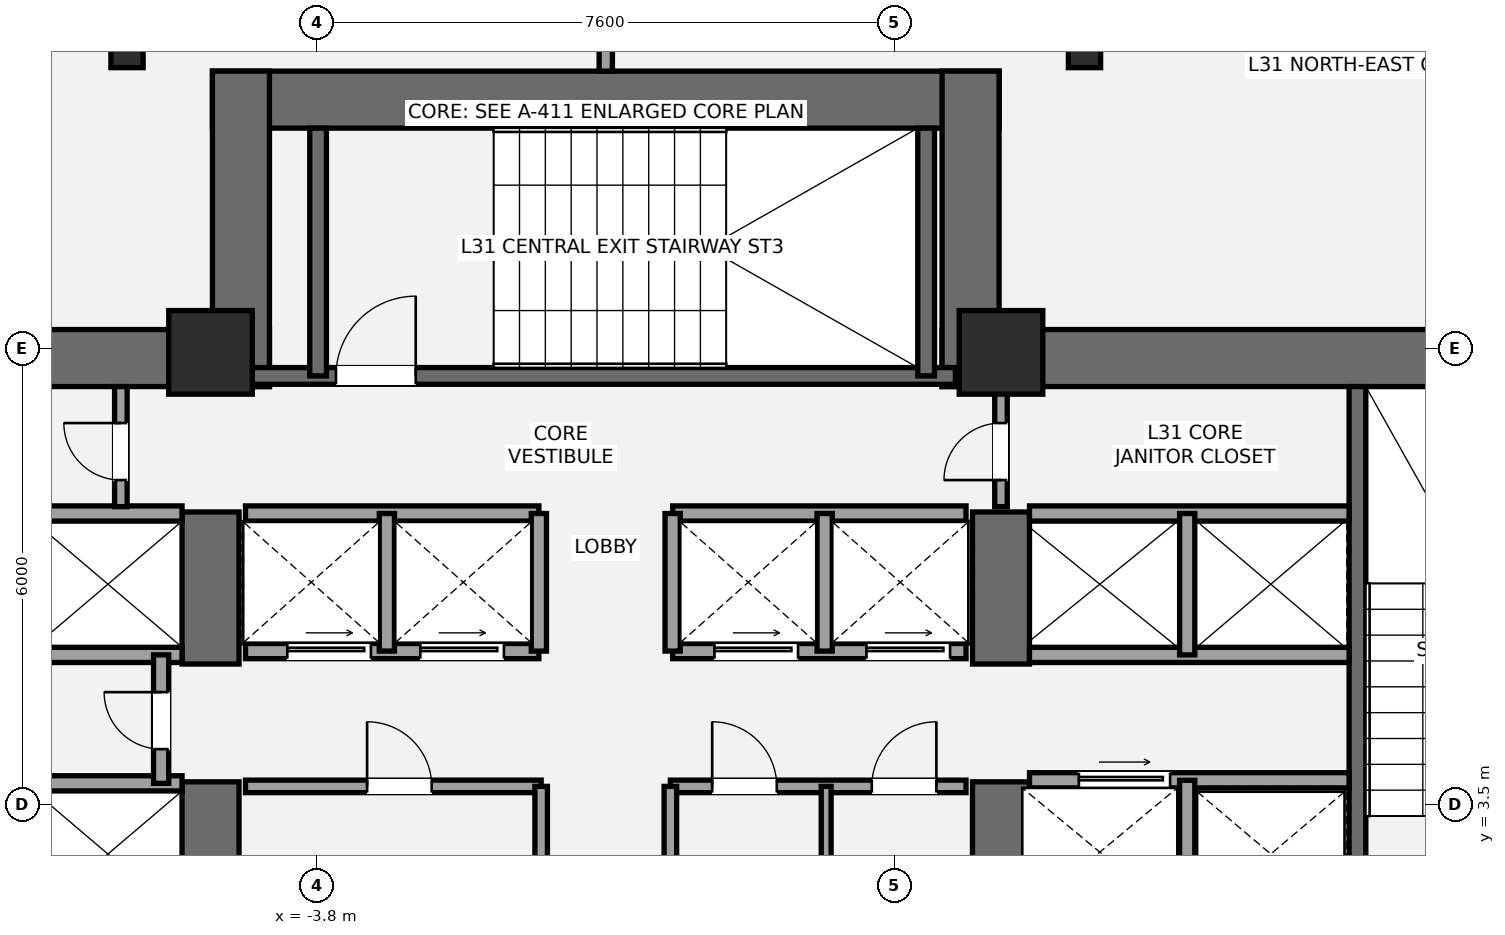
"""IFC4 building model, lengths in metres.
Left out: names, types, materials, properties, quantities, classifications, styles, units other than length and angle.
Written with IfcOpenShell. Run it as: python <this file> out.ifc"""

import sys

from ifc_helpers import new_model, si_unit, direction, frame, frame_2d, origin, origin_2d, place, context, subcontext, project, spatial, rectangle, i_section, extrude, element, fill, save


model = new_model("IFC4")
c1 = context("Model", 3, precision=1e-05, world=origin(), true_north=direction((0.0, 1.0)))
c2 = subcontext(c1, "Body", "Model", "MODEL_VIEW")
j1 = project(units=[si_unit("LENGTHUNIT", "METRE"), si_unit("PLANEANGLEUNIT", "RADIAN")], contexts=[c1])
p1 = place(None, origin())
s1 = spatial("IfcSite", under=j1, at=p1, CompositionType="ELEMENT")
p2 = place(p1, origin())
s2 = spatial("IfcBuilding", under=s1, at=p2, CompositionType="ELEMENT")
p3 = place(p2, frame((0.0, 0.0, 117.6)))
s3 = spatial("IfcBuildingStorey", under=s2, at=p3, CompositionType="ELEMENT", Elevation=117.6)
p4 = place(p3, frame((-13.9, 9.375, 0.0), z_axis=(0.0, 0.0, 1.0), x_axis=(1.0, 0.0, 0.0)))
e1 = element("IfcWall", 1, at=p4, inside=s3, PredefinedType="SHEAR", context=c2, shape_type="SweptSolid", body=[
    extrude(rectangle(XDim=9.475, YDim=0.75, at=frame_2d((4.737, 0.0))), origin(), (0.0, 0.0, 1.0), 3.5),
])
p5 = place(p3, frame((-5.2, 1.1, 0.0), z_axis=(0.0, 0.0, 1.0), x_axis=(0.0, 1.0, 0.0)))
e2 = element("IfcWall", 2, at=p5, inside=s3, PredefinedType="SHEAR", context=c2, shape_type="SweptSolid", body=[
    extrude(rectangle(XDim=2.7, YDim=0.75, at=frame_2d((1.35, 0.0))), origin(), (0.0, 0.0, 1.0), 3.5),
])
p6 = place(p3, frame((-5.2, 5.35, 0.0), z_axis=(0.0, 0.0, 1.0), x_axis=(0.0, 1.0, 0.0)))
e3 = element("IfcWall", 3, at=p6, inside=s3, PredefinedType="SHEAR", context=c2, shape_type="SweptSolid", body=[
    extrude(rectangle(XDim=2.0, YDim=0.75, at=frame_2d((1.0, 0.0))), origin(), (0.0, 0.0, 1.0), 3.5),
])
p7 = place(p3, frame((4.425, 9.375, 0.0), z_axis=(0.0, 0.0, 1.0), x_axis=(1.0, 0.0, 0.0)))
e4 = element("IfcWall", 4, at=p7, inside=s3, PredefinedType="SHEAR", context=c2, shape_type="SweptSolid", body=[
    extrude(rectangle(XDim=9.475, YDim=0.75, at=frame_2d((4.737, 0.0))), origin(), (0.0, 0.0, 1.0), 3.5),
])
p8 = place(p3, frame((5.2, 1.1, 0.0), z_axis=(0.0, 0.0, 1.0), x_axis=(0.0, 1.0, 0.0)))
e5 = element("IfcWall", 5, at=p8, inside=s3, PredefinedType="SHEAR", context=c2, shape_type="SweptSolid", body=[
    extrude(rectangle(XDim=2.7, YDim=0.75, at=frame_2d((1.35, 0.0))), origin(), (0.0, 0.0, 1.0), 3.5),
])
p9 = place(p3, frame((5.2, 5.35, 0.0), z_axis=(0.0, 0.0, 1.0), x_axis=(0.0, 1.0, 0.0)))
e6 = element("IfcWall", 6, at=p9, inside=s3, PredefinedType="SHEAR", context=c2, shape_type="SweptSolid", body=[
    extrude(rectangle(XDim=2.0, YDim=0.75, at=frame_2d((1.0, 0.0))), origin(), (0.0, 0.0, 1.0), 3.5),
])
p10 = place(p3, frame((9.89, 1.85, 0.0), z_axis=(0.0, 0.0, 1.0), x_axis=(0.0, 1.0, 0.0)))
e7 = element("IfcWall", 7, at=p10, inside=s3, PredefinedType="SHEAR", context=c2, shape_type="SweptSolid", body=[
    extrude(rectangle(XDim=7.15, YDim=0.22, at=frame_2d((3.575, 0.0))), origin(), (0.0, 0.0, 1.0), 3.5),
])
p11 = place(p3, frame((-5.175, 12.775, 0.0), z_axis=(0.0, 0.0, 1.0), x_axis=(1.0, 0.0, 0.0)))
e8 = element("IfcWall", 8, at=p11, inside=s3, PredefinedType="SHEAR", context=c2, shape_type="SweptSolid", body=[
    extrude(rectangle(XDim=10.35, YDim=0.75, at=frame_2d((5.175, 0.0))), origin(), (0.0, 0.0, 1.0), 3.5),
])
for number, where, z_axis, x_axis in (
    (9, (-4.8, 9.0, 0.0), (0.0, 0.0, 1.0), (0.0, 1.0, 0.0)),
    (10, (4.8, 9.0, 0.0), (0.0, 0.0, 1.0), (0.0, 1.0, 0.0)),
):
    element("IfcWall", number, at=place(p3, frame(where, z_axis=z_axis, x_axis=x_axis)), inside=s3, PredefinedType="SHEAR", context=c2, shape_type="SweptSolid", body=[
        extrude(rectangle(XDim=4.15, YDim=0.75, at=frame_2d((2.075, 0.0))), origin(), (0.0, 0.0, 1.0), 3.5),
    ])
p12 = place(p3, frame((-4.7, 9.14, 0.0), z_axis=(0.0, 0.0, 1.0), x_axis=(1.0, 0.0, 0.0)))
e11 = element("IfcWall", 11, at=p12, inside=s3, PredefinedType="SHEAR", context=c2, shape_type="SweptSolid", body=[
    extrude(rectangle(XDim=9.3, YDim=0.22, at=frame_2d((4.65, 0.0))), origin(), (0.0, 0.0, 1.0), 3.5),
])
p13 = place(p12, frame((1.15, 0.0, 0.0)))
e12 = element("IfcOpeningElement", 12, at=p13, cuts=e11, PredefinedType="OPENING", context=c2, shape_type="SweptSolid", body=[
    extrude(rectangle(XDim=1.05, YDim=2.15, at=frame_2d((0.525, 1.075))), frame((0.0, 0.12, 0.0), z_axis=(0.0, -1.0, 0.0), x_axis=(1.0, 0.0, 0.0)), (0.0, 0.0, 1.0), 0.24),
])
for number, where, z_axis, x_axis in (
    (13, (-3.785, 9.14, 0.0), (0.0, 0.0, 1.0), (0.0, 1.0, 0.0)),
    (14, (4.215, 9.14, 0.0), (0.0, 0.0, 1.0), (0.0, 1.0, 0.0)),
):
    element("IfcWall", number, at=place(p3, frame(where, z_axis=z_axis, x_axis=x_axis)), inside=s3, PredefinedType="SHEAR", context=c2, shape_type="SweptSolid", body=[
        extrude(rectangle(XDim=3.26, YDim=0.22, at=frame_2d((1.63, 0.0))), origin(), (0.0, 0.0, 1.0), 3.5),
    ])
for number, where, z_axis, x_axis in (
    (15, (-5.2, 9.45, 0.0), (0.0, 0.0, 1.0), (1.0, 0.0, 0.0)),
    (16, (5.2, 9.45, 0.0), (0.0, 0.0, 1.0), (1.0, 0.0, 0.0)),
):
    element("IfcColumn", number, at=place(p3, frame(where, z_axis=z_axis, x_axis=x_axis)), inside=s3, PredefinedType="COLUMN", context=c2, shape_type="SweptSolid", body=[
        extrude(rectangle(XDim=1.1, YDim=1.1, at=origin_2d()), origin(), (0.0, 0.0, 1.0), 3.5),
    ])
for number, where, z_axis, x_axis in (
    (17, (6.299, 13.433, 0.0), (0.0, 0.0, 1.0), (1.0, 0.0, 0.0)),
    (18, (-6.299, 13.433, 0.0), (0.0, 0.0, 1.0), (1.0, 0.0, 0.0)),
):
    element("IfcColumn", number, at=place(p3, frame(where, z_axis=z_axis, x_axis=x_axis)), inside=s3, PredefinedType="COLUMN", context=c2, shape_type="SweptSolid", body=[
        extrude(i_section(OverallWidth=0.424, OverallDepth=0.474, WebThickness=0.048, FlangeThickness=0.077, at=origin_2d()), origin(), (0.0, 0.0, 1.0), 3.5),
    ])
for number, where, z_axis, x_axis in (
    (19, (-9.78, 3.78, 0.0), (0.0, 0.0, 1.0), (1.0, 0.0, 0.0)),
    (20, (-9.78, 5.47, 0.0), (0.0, 0.0, 1.0), (1.0, 0.0, 0.0)),
    (21, (-9.78, 7.33, 0.0), (0.0, 0.0, 1.0), (1.0, 0.0, 0.0)),
):
    element("IfcWall", number, at=place(p3, frame(where, z_axis=z_axis, x_axis=x_axis)), inside=s3, PredefinedType="SOLIDWALL", context=c2, shape_type="SweptSolid", body=[
        extrude(rectangle(XDim=4.205, YDim=0.2, at=frame_2d((2.103, 0.0))), origin(), (0.0, 0.0, 1.0), 3.31),
    ])
p14 = place(p3, frame((-5.85, 3.78, 0.0), z_axis=(0.0, 0.0, 1.0), x_axis=(0.0, 1.0, 0.0)))
e22 = element("IfcWall", 22, at=p14, inside=s3, PredefinedType="SOLIDWALL", context=c2, shape_type="SweptSolid", body=[
    extrude(rectangle(XDim=1.69, YDim=0.2, at=frame_2d((0.845, 0.0))), origin(), (0.0, 0.0, 1.0), 3.31),
])
p15 = place(p14, frame((0.45, 0.0, 0.0)))
e23 = element("IfcOpeningElement", 23, at=p15, cuts=e22, PredefinedType="OPENING", context=c2, shape_type="SweptSolid", body=[
    extrude(rectangle(XDim=0.75, YDim=2.1, at=frame_2d((0.375, 1.05))), frame((0.0, 0.11, 0.0), z_axis=(0.0, -1.0, 0.0), x_axis=(1.0, 0.0, 0.0)), (0.0, 0.0, 1.0), 0.22),
])
p16 = place(p3, frame((5.575, 3.82, 0.0), z_axis=(0.0, 0.0, 1.0), x_axis=(1.0, 0.0, 0.0)))
e24 = element("IfcWall", 24, at=p16, inside=s3, PredefinedType="SOLIDWALL", context=c2, shape_type="SweptSolid", body=[
    extrude(rectangle(XDim=4.205, YDim=0.2, at=frame_2d((2.103, 0.0))), origin(), (0.0, 0.0, 1.0), 3.31),
])
p17 = place(p16, frame((0.65, 0.0, 0.0)))
e25 = element("IfcOpeningElement", 25, at=p17, cuts=e24, PredefinedType="OPENING", context=c2, shape_type="SweptSolid", body=[
    extrude(rectangle(XDim=1.2, YDim=2.2, at=frame_2d((0.6, 1.1))), frame((0.0, 0.11, 0.0), z_axis=(0.0, -1.0, 0.0), x_axis=(1.0, 0.0, 0.0)), (0.0, 0.0, 1.0), 0.22),
])
p18 = place(p3, frame((7.65, 1.85, 0.0), z_axis=(0.0, 0.0, 1.0), x_axis=(0.0, 1.0, 0.0)))
e26 = element("IfcWall", 26, at=p18, inside=s3, PredefinedType="SOLIDWALL", context=c2, shape_type="SweptSolid", body=[
    extrude(rectangle(XDim=1.97, YDim=0.2, at=frame_2d((0.985, 0.0))), origin(), (0.0, 0.0, 1.0), 3.31),
])
for number, where, z_axis, x_axis in (
    (27, (5.575, 5.47, 0.0), (0.0, 0.0, 1.0), (1.0, 0.0, 0.0)),
    (28, (5.575, 7.33, 0.0), (0.0, 0.0, 1.0), (1.0, 0.0, 0.0)),
):
    element("IfcWall", number, at=place(p3, frame(where, z_axis=z_axis, x_axis=x_axis)), inside=s3, PredefinedType="SOLIDWALL", context=c2, shape_type="SweptSolid", body=[
        extrude(rectangle(XDim=4.205, YDim=0.2, at=frame_2d((2.103, 0.0))), origin(), (0.0, 0.0, 1.0), 3.31),
    ])
p19 = place(p3, frame((7.65, 5.47, 0.0), z_axis=(0.0, 0.0, 1.0), x_axis=(0.0, 1.0, 0.0)))
e29 = element("IfcWall", 29, at=p19, inside=s3, PredefinedType="SOLIDWALL", context=c2, shape_type="SweptSolid", body=[
    extrude(rectangle(XDim=1.86, YDim=0.2, at=frame_2d((0.93, 0.0))), origin(), (0.0, 0.0, 1.0), 3.31),
])
p20 = place(p3, frame((-4.74, 3.74, 0.0), z_axis=(0.0, 0.0, 1.0), x_axis=(1.0, 0.0, 0.0)))
e30 = element("IfcWall", 30, at=p20, inside=s3, PredefinedType="PARTITIONING", context=c2, shape_type="SweptSolid", body=[
    extrude(rectangle(XDim=3.89, YDim=0.165, at=frame_2d((1.945, 0.0))), origin(), (0.0, 0.0, 1.0), 3.31),
])
p21 = place(p20, frame((1.6, 0.0, 0.0)))
e31 = element("IfcOpeningElement", 31, at=p21, cuts=e30, PredefinedType="OPENING", context=c2, shape_type="SweptSolid", body=[
    extrude(rectangle(XDim=0.85, YDim=2.1, at=frame_2d((0.425, 1.05))), frame((0.0, 0.093, 0.0), z_axis=(0.0, -1.0, 0.0), x_axis=(1.0, 0.0, 0.0)), (0.0, 0.0, 1.0), 0.185),
])
p22 = place(p3, frame((-0.85, 1.92, 0.0), z_axis=(0.0, 0.0, 1.0), x_axis=(0.0, 1.0, 0.0)))
e32 = element("IfcWall", 32, at=p22, inside=s3, PredefinedType="PARTITIONING", context=c2, shape_type="SweptSolid", body=[
    extrude(rectangle(XDim=1.82, YDim=0.165, at=frame_2d((0.91, 0.0))), origin(), (0.0, 0.0, 1.0), 3.31),
])
p23 = place(p3, frame((0.85, 3.74, 0.0), z_axis=(0.0, 0.0, 1.0), x_axis=(1.0, 0.0, 0.0)))
e33 = element("IfcWall", 33, at=p23, inside=s3, PredefinedType="PARTITIONING", context=c2, shape_type="SweptSolid", body=[
    extrude(rectangle(XDim=3.89, YDim=0.165, at=frame_2d((1.945, 0.0))), origin(), (0.0, 0.0, 1.0), 3.31),
])
p24 = place(p23, frame((0.55, 0.0, 0.0)))
e34 = element("IfcOpeningElement", 34, at=p24, cuts=e33, PredefinedType="OPENING", context=c2, shape_type="SweptSolid", body=[
    extrude(rectangle(XDim=0.85, YDim=2.1, at=frame_2d((0.425, 1.05))), frame((0.0, 0.093, 0.0), z_axis=(0.0, -1.0, 0.0), x_axis=(1.0, 0.0, 0.0)), (0.0, 0.0, 1.0), 0.185),
])
p25 = place(p23, frame((2.65, 0.0, 0.0)))
e35 = element("IfcOpeningElement", 35, at=p25, cuts=e33, PredefinedType="OPENING", context=c2, shape_type="SweptSolid", body=[
    extrude(rectangle(XDim=0.85, YDim=2.1, at=frame_2d((0.425, 1.05))), frame((0.0, 0.093, 0.0), z_axis=(0.0, -1.0, 0.0), x_axis=(1.0, 0.0, 0.0)), (0.0, 0.0, 1.0), 0.185),
])
p26 = place(p3, frame((0.85, 1.92, 0.0), z_axis=(0.0, 0.0, 1.0), x_axis=(0.0, 1.0, 0.0)))
e36 = element("IfcWall", 36, at=p26, inside=s3, PredefinedType="PARTITIONING", context=c2, shape_type="SweptSolid", body=[
    extrude(rectangle(XDim=1.82, YDim=0.165, at=frame_2d((0.91, 0.0))), origin(), (0.0, 0.0, 1.0), 3.31),
])
p27 = place(p3, frame((2.9, 1.92, 0.0), z_axis=(0.0, 0.0, 1.0), x_axis=(0.0, 1.0, 0.0)))
e37 = element("IfcWall", 37, at=p27, inside=s3, PredefinedType="PARTITIONING", context=c2, shape_type="SweptSolid", body=[
    extrude(rectangle(XDim=1.82, YDim=0.13, at=frame_2d((0.91, 0.0))), origin(), (0.0, 0.0, 1.0), 3.31),
])
p28 = place(p3, frame((-4.74, 5.52, 0.0), z_axis=(0.0, 0.0, 1.0), x_axis=(1.0, 0.0, 0.0)))
e38 = element("IfcWall", 38, at=p28, inside=s3, PredefinedType="SOLIDWALL", context=c2, shape_type="SweptSolid", body=[
    extrude(rectangle(XDim=3.86, YDim=0.2, at=frame_2d((1.93, 0.0))), origin(), (0.0, 0.0, 1.0), 3.31),
])
p29 = place(p28, frame((0.55, 0.0, 0.0)))
e39 = element("IfcOpeningElement", 39, at=p29, cuts=e38, PredefinedType="OPENING", context=c2, shape_type="SweptSolid", body=[
    extrude(rectangle(XDim=1.1, YDim=2.2, at=frame_2d((0.55, 1.1))), frame((0.0, 0.11, 0.0), z_axis=(0.0, -1.0, 0.0), x_axis=(1.0, 0.0, 0.0)), (0.0, 0.0, 1.0), 0.22),
])
p30 = place(p28, frame((2.3, 0.0, 0.0)))
e40 = element("IfcOpeningElement", 40, at=p30, cuts=e38, PredefinedType="OPENING", context=c2, shape_type="SweptSolid", body=[
    extrude(rectangle(XDim=1.1, YDim=2.2, at=frame_2d((0.55, 1.1))), frame((0.0, 0.11, 0.0), z_axis=(0.0, -1.0, 0.0), x_axis=(1.0, 0.0, 0.0)), (0.0, 0.0, 1.0), 0.22),
])
p31 = place(p3, frame((0.88, 5.52, 0.0), z_axis=(0.0, 0.0, 1.0), x_axis=(1.0, 0.0, 0.0)))
e41 = element("IfcWall", 41, at=p31, inside=s3, PredefinedType="SOLIDWALL", context=c2, shape_type="SweptSolid", body=[
    extrude(rectangle(XDim=3.86, YDim=0.2, at=frame_2d((1.93, 0.0))), origin(), (0.0, 0.0, 1.0), 3.31),
])
p32 = place(p31, frame((0.55, 0.0, 0.0)))
e42 = element("IfcOpeningElement", 42, at=p32, cuts=e41, PredefinedType="OPENING", context=c2, shape_type="SweptSolid", body=[
    extrude(rectangle(XDim=1.1, YDim=2.2, at=frame_2d((0.55, 1.1))), frame((0.0, 0.11, 0.0), z_axis=(0.0, -1.0, 0.0), x_axis=(1.0, 0.0, 0.0)), (0.0, 0.0, 1.0), 0.22),
])
p33 = place(p31, frame((2.55, 0.0, 0.0)))
e43 = element("IfcOpeningElement", 43, at=p33, cuts=e41, PredefinedType="OPENING", context=c2, shape_type="SweptSolid", body=[
    extrude(rectangle(XDim=1.1, YDim=2.2, at=frame_2d((0.55, 1.1))), frame((0.0, 0.11, 0.0), z_axis=(0.0, -1.0, 0.0), x_axis=(1.0, 0.0, 0.0)), (0.0, 0.0, 1.0), 0.22),
])
for number, where, z_axis, x_axis in (
    (44, (-4.74, 7.33, 0.0), (0.0, 0.0, 1.0), (1.0, 0.0, 0.0)),
    (45, (0.88, 7.33, 0.0), (0.0, 0.0, 1.0), (1.0, 0.0, 0.0)),
):
    element("IfcWall", number, at=place(p3, frame(where, z_axis=z_axis, x_axis=x_axis)), inside=s3, PredefinedType="SOLIDWALL", context=c2, shape_type="SweptSolid", body=[
        extrude(rectangle(XDim=3.86, YDim=0.2, at=frame_2d((1.93, 0.0))), origin(), (0.0, 0.0, 1.0), 3.31),
    ])
for number, where, z_axis, x_axis in (
    (46, (-2.88, 5.52, 0.0), (0.0, 0.0, 1.0), (0.0, 1.0, 0.0)),
    (47, (2.88, 5.52, 0.0), (0.0, 0.0, 1.0), (0.0, 1.0, 0.0)),
    (48, (-0.88, 5.52, 0.0), (0.0, 0.0, 1.0), (0.0, 1.0, 0.0)),
    (49, (0.88, 5.52, 0.0), (0.0, 0.0, 1.0), (0.0, 1.0, 0.0)),
):
    element("IfcWall", number, at=place(p3, frame(where, z_axis=z_axis, x_axis=x_axis)), inside=s3, PredefinedType="SOLIDWALL", context=c2, shape_type="SweptSolid", body=[
        extrude(rectangle(XDim=1.81, YDim=0.2, at=frame_2d((0.905, 0.0))), origin(), (0.0, 0.0, 1.0), 3.31),
    ])
p34 = place(p3, frame((-6.38, 7.42, 0.0), z_axis=(0.0, 0.0, 1.0), x_axis=(0.0, 1.0, 0.0)))
e50 = element("IfcWall", 50, at=p34, inside=s3, PredefinedType="PARTITIONING", context=c2, shape_type="SweptSolid", body=[
    extrude(rectangle(XDim=1.58, YDim=0.165, at=frame_2d((0.79, 0.0))), origin(), (0.0, 0.0, 1.0), 3.31),
])
p35 = place(p34, frame((0.35, 0.0, 0.0)))
e51 = element("IfcOpeningElement", 51, at=p35, cuts=e50, PredefinedType="OPENING", context=c2, shape_type="SweptSolid", body=[
    extrude(rectangle(XDim=0.75, YDim=2.1, at=frame_2d((0.375, 1.05))), frame((0.0, 0.093, 0.0), z_axis=(0.0, -1.0, 0.0), x_axis=(1.0, 0.0, 0.0)), (0.0, 0.0, 1.0), 0.185),
])
p36 = place(p3, frame((5.2, 7.42, 0.0), z_axis=(0.0, 0.0, 1.0), x_axis=(0.0, 1.0, 0.0)))
e52 = element("IfcWall", 52, at=p36, inside=s3, PredefinedType="PARTITIONING", context=c2, shape_type="SweptSolid", body=[
    extrude(rectangle(XDim=1.58, YDim=0.165, at=frame_2d((0.79, 0.0))), origin(), (0.0, 0.0, 1.0), 3.31),
])
p37 = place(p36, frame((0.35, 0.0, 0.0)))
e53 = element("IfcOpeningElement", 53, at=p37, cuts=e52, PredefinedType="OPENING", context=c2, shape_type="SweptSolid", body=[
    extrude(rectangle(XDim=0.75, YDim=2.1, at=frame_2d((0.375, 1.05))), frame((0.0, 0.093, 0.0), z_axis=(0.0, -1.0, 0.0), x_axis=(1.0, 0.0, 0.0)), (0.0, 0.0, 1.0), 0.185),
])
p38 = place(p3, frame((0.0, 13.15, 0.0), z_axis=(0.0, 0.0, 1.0), x_axis=(0.0, 1.0, 0.0)))
e54 = element("IfcWall", 54, at=p38, inside=s3, PredefinedType="PARTITIONING", context=c2, shape_type="SweptSolid", body=[
    extrude(rectangle(XDim=4.383, YDim=0.175, at=frame_2d((2.191, 0.0))), origin(), (0.0, 0.0, 1.0), 3.31),
])
p39 = place(p13, origin())
e55 = element("IfcDoor", 55, at=p39, inside=s3, OperationType="SINGLE_SWING_RIGHT", PredefinedType="DOOR", context=c2, shape_type="SweptSolid", body=[
    extrude(rectangle(XDim=1.05, YDim=2.15, at=frame_2d((0.525, 1.075))), frame((0.0, 0.025, 0.0), z_axis=(0.0, -1.0, 0.0), x_axis=(1.0, 0.0, 0.0)), (0.0, 0.0, 1.0), 0.05),
])
fill(e12, e55)
p40 = place(p15, origin())
e56 = element("IfcDoor", 56, at=p40, inside=s3, OperationType="SINGLE_SWING_RIGHT", PredefinedType="DOOR", context=c2, shape_type="SweptSolid", body=[
    extrude(rectangle(XDim=0.75, YDim=2.1, at=frame_2d((0.375, 1.05))), frame((0.0, 0.025, 0.0), z_axis=(0.0, -1.0, 0.0), x_axis=(1.0, 0.0, 0.0)), (0.0, 0.0, 1.0), 0.05),
])
fill(e23, e56)
p41 = place(p17, origin())
e57 = element("IfcDoor", 57, at=p41, inside=s3, OperationType="SLIDING_TO_RIGHT", PredefinedType="DOOR", context=c2, shape_type="SweptSolid", body=[
    extrude(rectangle(XDim=1.2, YDim=2.2, at=frame_2d((0.6, 1.1))), frame((0.0, 0.025, 0.0), z_axis=(0.0, -1.0, 0.0), x_axis=(1.0, 0.0, 0.0)), (0.0, 0.0, 1.0), 0.05),
])
fill(e25, e57)
p42 = place(p21, origin())
e58 = element("IfcDoor", 58, at=p42, inside=s3, OperationType="SINGLE_SWING_LEFT", PredefinedType="DOOR", context=c2, shape_type="SweptSolid", body=[
    extrude(rectangle(XDim=0.85, YDim=2.1, at=frame_2d((0.425, 1.05))), frame((0.0, 0.025, 0.0), z_axis=(0.0, -1.0, 0.0), x_axis=(1.0, 0.0, 0.0)), (0.0, 0.0, 1.0), 0.05),
])
fill(e31, e58)
p43 = place(p24, origin())
e59 = element("IfcDoor", 59, at=p43, inside=s3, OperationType="SINGLE_SWING_LEFT", PredefinedType="DOOR", context=c2, shape_type="SweptSolid", body=[
    extrude(rectangle(XDim=0.85, YDim=2.1, at=frame_2d((0.425, 1.05))), frame((0.0, 0.025, 0.0), z_axis=(0.0, -1.0, 0.0), x_axis=(1.0, 0.0, 0.0)), (0.0, 0.0, 1.0), 0.05),
])
fill(e34, e59)
p44 = place(p25, origin())
e60 = element("IfcDoor", 60, at=p44, inside=s3, OperationType="SINGLE_SWING_RIGHT", PredefinedType="DOOR", context=c2, shape_type="SweptSolid", body=[
    extrude(rectangle(XDim=0.85, YDim=2.1, at=frame_2d((0.425, 1.05))), frame((0.0, 0.025, 0.0), z_axis=(0.0, -1.0, 0.0), x_axis=(1.0, 0.0, 0.0)), (0.0, 0.0, 1.0), 0.05),
])
fill(e35, e60)
p45 = place(p29, origin())
e61 = element("IfcDoor", 61, at=p45, inside=s3, OperationType="SLIDING_TO_LEFT", PredefinedType="DOOR", context=c2, shape_type="SweptSolid", body=[
    extrude(rectangle(XDim=1.1, YDim=2.2, at=frame_2d((0.55, 1.1))), frame((0.0, 0.025, 0.0), z_axis=(0.0, -1.0, 0.0), x_axis=(1.0, 0.0, 0.0)), (0.0, 0.0, 1.0), 0.05),
])
fill(e39, e61)
p46 = place(p30, origin())
e62 = element("IfcDoor", 62, at=p46, inside=s3, OperationType="SLIDING_TO_LEFT", PredefinedType="DOOR", context=c2, shape_type="SweptSolid", body=[
    extrude(rectangle(XDim=1.1, YDim=2.2, at=frame_2d((0.55, 1.1))), frame((0.0, 0.025, 0.0), z_axis=(0.0, -1.0, 0.0), x_axis=(1.0, 0.0, 0.0)), (0.0, 0.0, 1.0), 0.05),
])
fill(e40, e62)
p47 = place(p32, origin())
e63 = element("IfcDoor", 63, at=p47, inside=s3, OperationType="SLIDING_TO_LEFT", PredefinedType="DOOR", context=c2, shape_type="SweptSolid", body=[
    extrude(rectangle(XDim=1.1, YDim=2.2, at=frame_2d((0.55, 1.1))), frame((0.0, 0.025, 0.0), z_axis=(0.0, -1.0, 0.0), x_axis=(1.0, 0.0, 0.0)), (0.0, 0.0, 1.0), 0.05),
])
fill(e42, e63)
p48 = place(p33, origin())
e64 = element("IfcDoor", 64, at=p48, inside=s3, OperationType="SLIDING_TO_LEFT", PredefinedType="DOOR", context=c2, shape_type="SweptSolid", body=[
    extrude(rectangle(XDim=1.1, YDim=2.2, at=frame_2d((0.55, 1.1))), frame((0.0, 0.025, 0.0), z_axis=(0.0, -1.0, 0.0), x_axis=(1.0, 0.0, 0.0)), (0.0, 0.0, 1.0), 0.05),
])
fill(e43, e64)
p49 = place(p35, origin())
e65 = element("IfcDoor", 65, at=p49, inside=s3, OperationType="SINGLE_SWING_RIGHT", PredefinedType="DOOR", context=c2, shape_type="SweptSolid", body=[
    extrude(rectangle(XDim=0.75, YDim=2.1, at=frame_2d((0.375, 1.05))), frame((0.0, 0.025, 0.0), z_axis=(0.0, -1.0, 0.0), x_axis=(1.0, 0.0, 0.0)), (0.0, 0.0, 1.0), 0.05),
])
fill(e51, e65)
p50 = place(p37, origin())
e66 = element("IfcDoor", 66, at=p50, inside=s3, OperationType="SINGLE_SWING_LEFT", PredefinedType="DOOR", context=c2, shape_type="SweptSolid", body=[
    extrude(rectangle(XDim=0.75, YDim=2.1, at=frame_2d((0.375, 1.05))), frame((0.0, 0.025, 0.0), z_axis=(0.0, -1.0, 0.0), x_axis=(1.0, 0.0, 0.0)), (0.0, 0.0, 1.0), 0.05),
])
fill(e53, e66)
save(model, sys.argv[1])
